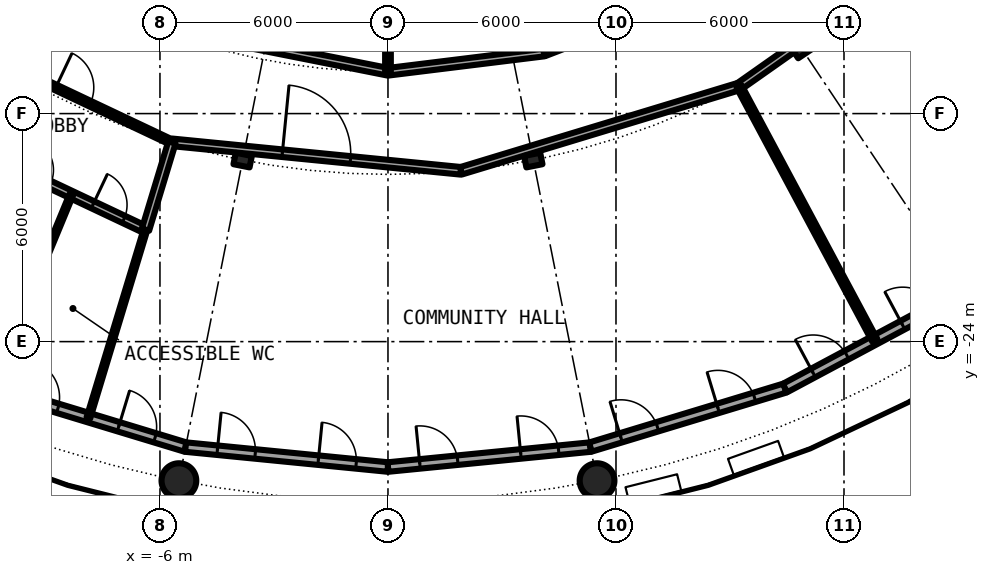
"""IFC4 building model, lengths in metres.
Left out: names, types, materials, properties, quantities, classifications, styles, units other than length and angle.
Written with IfcOpenShell. Run it as: python <this file> out.ifc"""

import sys

from ifc_helpers import new_model, si_unit, direction, frame, frame_2d, origin, origin_2d, place, context, subcontext, project, spatial, rectangle, hollow_circle, i_section, extrude, element, fill, save


model = new_model("IFC4")
c1 = context("Model", 3, precision=1e-05, world=origin(), true_north=direction((0.0, 1.0)))
c2 = subcontext(c1, "Body", "Model", "MODEL_VIEW")
j1 = project(units=[si_unit("LENGTHUNIT", "METRE"), si_unit("PLANEANGLEUNIT", "RADIAN")], contexts=[c1])
p1 = place(None, origin())
s1 = spatial("IfcSite", under=j1, at=p1, CompositionType="ELEMENT")
p2 = place(p1, origin())
s2 = spatial("IfcBuilding", under=s1, at=p2, CompositionType="ELEMENT")
p3 = place(p2, frame((0.0, 0.0, 107.45)))
s3 = spatial("IfcBuildingStorey", under=s2, at=p3, CompositionType="ELEMENT", Elevation=107.45)
for number, where, z_axis, x_axis in (
    (1, (-5.501, -27.658, 0.0), (0.0, 0.0, 1.0), (1.0, 0.0, 0.0)),
    (2, (5.501, -27.658, 0.0), (0.0, 0.0, 1.0), (1.0, 0.0, 0.0)),
):
    element("IfcColumn", number, at=place(p3, frame(where, z_axis=z_axis, x_axis=x_axis)), inside=s3, PredefinedType="COLUMN", context=c2, shape_type="SweptSolid", body=[
        extrude(hollow_circle(Radius=0.457, WallThickness=0.04, at=origin_2d()), origin(), (0.0, 0.0, 1.0), 4.2),
    ])
for number, where, z_axis, x_axis in (
    (3, (-3.824, -19.223, 0.0), (0.0, 0.0, 1.0), (-0.195, -0.981, 0.0)),
    (4, (3.824, -19.223, 0.0), (0.0, 0.0, 1.0), (0.195, -0.981, 0.0)),
    (5, (10.889, -16.297, 0.0), (0.0, 0.0, 1.0), (0.556, -0.831, 0.0)),
):
    element("IfcColumn", number, at=place(p3, frame(where, z_axis=z_axis, x_axis=x_axis)), inside=s3, PredefinedType="COLUMN", context=c2, shape_type="SweptSolid", body=[
        extrude(i_section(OverallWidth=0.307, OverallDepth=0.432, WebThickness=0.021, FlangeThickness=0.04, FilletRadius=0.027, at=origin_2d()), origin(), (0.0, 0.0, 1.0), 4.2),
    ])
p4 = place(p3, frame((-10.447, -25.222, 0.0), z_axis=(0.0, 0.0, 1.0), x_axis=(0.956965678721, -0.290201119486, 0.0)))
e6 = element("IfcWall", 6, at=p4, inside=s3, PredefinedType="SOLIDWALL", context=c2, shape_type="SweptSolid", body=[
    extrude(rectangle(XDim=5.351, YDim=0.25, at=frame_2d((2.676, 0.0))), origin(), (0.0, 0.0, 1.0), 3.85),
])
p5 = place(p4, frame((0.841, 0.0, 0.0)))
e7 = element("IfcOpeningElement", 7, at=p5, cuts=e6, PredefinedType="OPENING", context=c2, shape_type="SweptSolid", body=[
    extrude(rectangle(XDim=1.0, YDim=2.2, at=frame_2d((0.5, 1.1))), frame((0.0, 0.135, 0.0), z_axis=(0.0, -1.0, 0.0), x_axis=(1.0, 0.0, 0.0)), (0.0, 0.0, 1.0), 0.27),
])
p6 = place(p4, frame((3.51, 0.0, 0.0)))
e8 = element("IfcOpeningElement", 8, at=p6, cuts=e6, PredefinedType="OPENING", context=c2, shape_type="SweptSolid", body=[
    extrude(rectangle(XDim=1.0, YDim=2.2, at=frame_2d((0.5, 1.1))), frame((0.0, 0.135, 0.0), z_axis=(0.0, -1.0, 0.0), x_axis=(1.0, 0.0, 0.0)), (0.0, 0.0, 1.0), 0.27),
])
p7 = place(p3, frame((-5.326, -26.775, 0.0), z_axis=(0.0, 0.0, 1.0), x_axis=(0.995173996315, -0.098126026407, 0.0)))
e9 = element("IfcWall", 9, at=p7, inside=s3, PredefinedType="SOLIDWALL", context=c2, shape_type="SweptSolid", body=[
    extrude(rectangle(XDim=5.352, YDim=0.25, at=frame_2d((2.676, 0.0))), origin(), (0.0, 0.0, 1.0), 3.85),
])
p8 = place(p7, frame((0.841, 0.0, 0.0)))
e10 = element("IfcOpeningElement", 10, at=p8, cuts=e9, PredefinedType="OPENING", context=c2, shape_type="SweptSolid", body=[
    extrude(rectangle(XDim=1.0, YDim=2.2, at=frame_2d((0.5, 1.1))), frame((0.0, 0.135, 0.0), z_axis=(0.0, -1.0, 0.0), x_axis=(1.0, 0.0, 0.0)), (0.0, 0.0, 1.0), 0.27),
])
p9 = place(p7, frame((3.51, 0.0, 0.0)))
e11 = element("IfcOpeningElement", 11, at=p9, cuts=e9, PredefinedType="OPENING", context=c2, shape_type="SweptSolid", body=[
    extrude(rectangle(XDim=1.0, YDim=2.2, at=frame_2d((0.5, 1.1))), frame((0.0, 0.135, 0.0), z_axis=(0.0, -1.0, 0.0), x_axis=(1.0, 0.0, 0.0)), (0.0, 0.0, 1.0), 0.27),
])
p10 = place(p3, frame((0.0, -27.3, 0.0), z_axis=(0.0, 0.0, 1.0), x_axis=(0.995173996315, 0.098126026407, 0.0)))
e12 = element("IfcWall", 12, at=p10, inside=s3, PredefinedType="SOLIDWALL", context=c2, shape_type="SweptSolid", body=[
    extrude(rectangle(XDim=5.352, YDim=0.25, at=frame_2d((2.676, 0.0))), origin(), (0.0, 0.0, 1.0), 3.85),
])
p11 = place(p10, frame((0.841, 0.0, 0.0)))
e13 = element("IfcOpeningElement", 13, at=p11, cuts=e12, PredefinedType="OPENING", context=c2, shape_type="SweptSolid", body=[
    extrude(rectangle(XDim=1.0, YDim=2.2, at=frame_2d((0.5, 1.1))), frame((0.0, 0.135, 0.0), z_axis=(0.0, -1.0, 0.0), x_axis=(1.0, 0.0, 0.0)), (0.0, 0.0, 1.0), 0.27),
])
p12 = place(p10, frame((3.51, 0.0, 0.0)))
e14 = element("IfcOpeningElement", 14, at=p12, cuts=e12, PredefinedType="OPENING", context=c2, shape_type="SweptSolid", body=[
    extrude(rectangle(XDim=1.0, YDim=2.2, at=frame_2d((0.5, 1.1))), frame((0.0, 0.135, 0.0), z_axis=(0.0, -1.0, 0.0), x_axis=(1.0, 0.0, 0.0)), (0.0, 0.0, 1.0), 0.27),
])
p13 = place(p3, frame((5.326, -26.775, 0.0), z_axis=(0.0, 0.0, 1.0), x_axis=(0.956965678721, 0.290201119486, 0.0)))
e15 = element("IfcWall", 15, at=p13, inside=s3, PredefinedType="SOLIDWALL", context=c2, shape_type="SweptSolid", body=[
    extrude(rectangle(XDim=5.351, YDim=0.25, at=frame_2d((2.676, 0.0))), origin(), (0.0, 0.0, 1.0), 3.85),
])
p14 = place(p13, frame((0.841, 0.0, 0.0)))
e16 = element("IfcOpeningElement", 16, at=p14, cuts=e15, PredefinedType="OPENING", context=c2, shape_type="SweptSolid", body=[
    extrude(rectangle(XDim=1.0, YDim=2.2, at=frame_2d((0.5, 1.1))), frame((0.0, 0.135, 0.0), z_axis=(0.0, -1.0, 0.0), x_axis=(1.0, 0.0, 0.0)), (0.0, 0.0, 1.0), 0.27),
])
p15 = place(p13, frame((3.51, 0.0, 0.0)))
e17 = element("IfcOpeningElement", 17, at=p15, cuts=e15, PredefinedType="OPENING", context=c2, shape_type="SweptSolid", body=[
    extrude(rectangle(XDim=1.0, YDim=2.2, at=frame_2d((0.5, 1.1))), frame((0.0, 0.135, 0.0), z_axis=(0.0, -1.0, 0.0), x_axis=(1.0, 0.0, 0.0)), (0.0, 0.0, 1.0), 0.27),
])
p16 = place(p3, frame((10.447, -25.222, 0.0), z_axis=(0.0, 0.0, 1.0), x_axis=(0.881915646801, 0.471407246368, 0.0)))
e18 = element("IfcWall", 18, at=p16, inside=s3, PredefinedType="SOLIDWALL", context=c2, shape_type="SweptSolid", body=[
    extrude(rectangle(XDim=5.352, YDim=0.25, at=frame_2d((2.676, 0.0))), origin(), (0.0, 0.0, 1.0), 3.85),
])
p17 = place(p16, frame((0.841, 0.0, 0.0)))
e19 = element("IfcOpeningElement", 19, at=p17, cuts=e18, PredefinedType="OPENING", context=c2, shape_type="SweptSolid", body=[
    extrude(rectangle(XDim=1.0, YDim=2.2, at=frame_2d((0.5, 1.1))), frame((0.0, 0.135, 0.0), z_axis=(0.0, -1.0, 0.0), x_axis=(1.0, 0.0, 0.0)), (0.0, 0.0, 1.0), 0.27),
])
p18 = place(p16, frame((3.51, 0.0, 0.0)))
e20 = element("IfcOpeningElement", 20, at=p18, cuts=e18, PredefinedType="OPENING", context=c2, shape_type="SweptSolid", body=[
    extrude(rectangle(XDim=1.0, YDim=2.2, at=frame_2d((0.5, 1.1))), frame((0.0, 0.135, 0.0), z_axis=(0.0, -1.0, 0.0), x_axis=(1.0, 0.0, 0.0)), (0.0, 0.0, 1.0), 0.27),
])
p19 = place(p3, frame((-12.223, -18.294, 0.0), z_axis=(0.0, 0.0, 1.0), x_axis=(0.904110764787, -0.427298168726, 0.0)))
e21 = element("IfcWall", 21, at=p19, inside=s3, PredefinedType="PARTITIONING", context=c2, shape_type="SweptSolid", body=[
    extrude(rectangle(XDim=6.459, YDim=0.2, at=frame_2d((3.229, 0.0))), origin(), (0.0, 0.0, 1.0), 3.85),
])
p20 = place(p19, frame((0.624, 0.0, 0.0)))
e22 = element("IfcOpeningElement", 22, at=p20, cuts=e21, PredefinedType="OPENING", context=c2, shape_type="SweptSolid", body=[
    extrude(rectangle(XDim=0.9, YDim=2.3, at=frame_2d((0.45, 1.15))), frame((0.0, 0.11, 0.0), z_axis=(0.0, -1.0, 0.0), x_axis=(1.0, 0.0, 0.0)), (0.0, 0.0, 1.0), 0.22),
])
p21 = place(p19, frame((2.788, 0.0, 0.0)))
e23 = element("IfcOpeningElement", 23, at=p21, cuts=e21, PredefinedType="OPENING", context=c2, shape_type="SweptSolid", body=[
    extrude(rectangle(XDim=0.9, YDim=2.3, at=frame_2d((0.45, 1.15))), frame((0.0, 0.11, 0.0), z_axis=(0.0, -1.0, 0.0), x_axis=(1.0, 0.0, 0.0)), (0.0, 0.0, 1.0), 0.22),
])
p22 = place(p19, frame((4.93, 0.0, 0.0)))
e24 = element("IfcOpeningElement", 24, at=p22, cuts=e21, PredefinedType="OPENING", context=c2, shape_type="SweptSolid", body=[
    extrude(rectangle(XDim=0.9, YDim=2.3, at=frame_2d((0.45, 1.15))), frame((0.0, 0.11, 0.0), z_axis=(0.0, -1.0, 0.0), x_axis=(1.0, 0.0, 0.0)), (0.0, 0.0, 1.0), 0.22),
])
p23 = place(p3, frame((9.239, -17.286, 0.0), z_axis=(0.0, 0.0, 1.0), x_axis=(0.817743843048, 0.575582320052, 0.0)))
e25 = element("IfcWall", 25, at=p23, inside=s3, PredefinedType="PARTITIONING", context=c2, shape_type="SweptSolid", body=[
    extrude(rectangle(XDim=1.768, YDim=0.2, at=frame_2d((0.884, 0.0))), origin(), (0.0, 0.0, 1.0), 3.54),
])
p24 = place(p3, frame((-10.749, -16.363, 0.0), z_axis=(0.0, 0.0, 1.0), x_axis=(0.903968655954, -0.427598724335, 0.0)))
e26 = element("IfcWall", 26, at=p24, inside=s3, PredefinedType="PARTITIONING", context=c2, shape_type="SweptSolid", body=[
    extrude(rectangle(XDim=5.596, YDim=0.15, at=frame_2d((2.798, 0.0))), origin(), (0.0, 0.0, 1.0), 3.54),
])
p25 = place(p24, frame((2.221, 0.0, 0.0)))
e27 = element("IfcOpeningElement", 27, at=p25, cuts=e26, PredefinedType="OPENING", context=c2, shape_type="SweptSolid", body=[
    extrude(rectangle(XDim=1.0, YDim=2.3, at=frame_2d((0.5, 1.15))), frame((0.0, 0.085, 0.0), z_axis=(0.0, -1.0, 0.0), x_axis=(1.0, 0.0, 0.0)), (0.0, 0.0, 1.0), 0.17),
])
p26 = place(p3, frame((-5.69, -18.756, 0.0), z_axis=(0.0, 0.0, 1.0), x_axis=(0.995179652705, -0.098068643521, 0.0)))
e28 = element("IfcWall", 28, at=p26, inside=s3, PredefinedType="PARTITIONING", context=c2, shape_type="SweptSolid", body=[
    extrude(rectangle(XDim=7.648, YDim=0.2, at=frame_2d((3.824, 0.0))), origin(), (0.0, 0.0, 1.0), 3.54),
])
p27 = place(p26, frame((2.924, 0.0, 0.0)))
e29 = element("IfcOpeningElement", 29, at=p27, cuts=e28, PredefinedType="OPENING", context=c2, shape_type="SweptSolid", body=[
    extrude(rectangle(XDim=1.8, YDim=2.3, at=frame_2d((0.9, 1.15))), frame((0.0, 0.11, 0.0), z_axis=(0.0, -1.0, 0.0), x_axis=(1.0, 0.0, 0.0)), (0.0, 0.0, 1.0), 0.22),
])
p28 = place(p3, frame((1.921, -19.506, 0.0), z_axis=(0.0, 0.0, 1.0), x_axis=(0.956929842753, 0.290319265721, 0.0)))
e30 = element("IfcWall", 30, at=p28, inside=s3, PredefinedType="PARTITIONING", context=c2, shape_type="SweptSolid", body=[
    extrude(rectangle(XDim=7.647, YDim=0.2, at=frame_2d((3.824, 0.0))), origin(), (0.0, 0.0, 1.0), 3.54),
])
p29 = place(p3, frame((0.0, -16.9, 0.0), z_axis=(0.0, 0.0, 1.0), x_axis=(0.992496033272, 0.122276833211, 0.0)))
e31 = element("IfcWall", 31, at=p29, inside=s3, PredefinedType="PARTITIONING", context=c2, shape_type="SweptSolid", body=[
    extrude(rectangle(XDim=4.137, YDim=0.2, at=frame_2d((2.068, 0.0))), origin(), (0.0, 0.0, 1.0), 3.85),
])
p30 = place(p3, frame((4.106, -16.394, 0.0), z_axis=(0.0, 0.0, 1.0), x_axis=(0.932943640288, 0.360022449363, 0.0)))
e32 = element("IfcWall", 32, at=p30, inside=s3, PredefinedType="PARTITIONING", context=c2, shape_type="SweptSolid", body=[
    extrude(rectangle(XDim=4.139, YDim=0.2, at=frame_2d((2.069, 0.0))), origin(), (0.0, 0.0, 1.0), 3.85),
])
p31 = place(p30, frame((1.569, 0.0, 0.0)))
e33 = element("IfcOpeningElement", 33, at=p31, cuts=e32, PredefinedType="OPENING", context=c2, shape_type="SweptSolid", body=[
    extrude(rectangle(XDim=1.0, YDim=2.3, at=frame_2d((0.5, 1.15))), frame((0.0, 0.11, 0.0), z_axis=(0.0, -1.0, 0.0), x_axis=(1.0, 0.0, 0.0)), (0.0, 0.0, 1.0), 0.22),
])
p32 = place(p3, frame((-6.467, -15.614, 0.0), z_axis=(0.0, 0.0, 1.0), x_axis=(0.980799374359, -0.195019453537, 0.0)))
e34 = element("IfcWall", 34, at=p32, inside=s3, PredefinedType="PARTITIONING", context=c2, shape_type="SweptSolid", body=[
    extrude(rectangle(XDim=6.594, YDim=0.2, at=frame_2d((3.297, 0.0))), origin(), (0.0, 0.0, 1.0), 3.85),
])
p33 = place(p32, frame((2.797, 0.0, 0.0)))
e35 = element("IfcOpeningElement", 35, at=p33, cuts=e34, PredefinedType="OPENING", context=c2, shape_type="SweptSolid", body=[
    extrude(rectangle(XDim=1.0, YDim=2.3, at=frame_2d((0.5, 1.15))), frame((0.0, 0.11, 0.0), z_axis=(0.0, -1.0, 0.0), x_axis=(1.0, 0.0, 0.0)), (0.0, 0.0, 1.0), 0.22),
])
p34 = place(p3, frame((-10.391, -25.11, 0.0), z_axis=(0.0, 0.0, 1.0), x_axis=(0.38229040446, 0.924042232075, 0.0)))
e36 = element("IfcWall", 36, at=p34, inside=s3, PredefinedType="PARTITIONING", context=c2, shape_type="SweptSolid", body=[
    extrude(rectangle(XDim=5.386, YDim=0.1, at=frame_2d((2.693, 0.0))), origin(), (0.0, 0.0, 1.0), 3.85),
])
p35 = place(p3, frame((-7.883, -26.007, 0.0), z_axis=(0.0, 0.0, 1.0), x_axis=(0.290185435468, 0.95697043478, 0.0)))
e37 = element("IfcWall", 37, at=p35, inside=s3, PredefinedType="PARTITIONING", context=c2, shape_type="SweptSolid", body=[
    extrude(rectangle(XDim=5.176, YDim=0.1, at=frame_2d((2.588, 0.0))), origin(), (0.0, 0.0, 1.0), 3.85),
])
p36 = place(p3, frame((-6.381, -21.054, 0.0), z_axis=(0.0, 0.0, 1.0), x_axis=(0.290128842027, 0.956987593976, 0.0)))
e38 = element("IfcWall", 38, at=p36, inside=s3, PredefinedType="PARTITIONING", context=c2, shape_type="SweptSolid", body=[
    extrude(rectangle(XDim=2.399, YDim=0.2, at=frame_2d((1.2, 0.0))), origin(), (0.0, 0.0, 1.0), 3.85),
])
p37 = place(p3, frame((0.0, -16.9, 0.0), z_axis=(0.0, 0.0, 1.0), x_axis=(0.0, 1.0, 0.0)))
e39 = element("IfcWall", 39, at=p37, inside=s3, PredefinedType="PARTITIONING", context=c2, shape_type="SweptSolid", body=[
    extrude(rectangle(XDim=9.18, YDim=0.15, at=frame_2d((4.59, 0.0))), origin(), (0.0, 0.0, 1.0), 3.85),
])
p38 = place(p3, frame((9.239, -17.286, 0.0), z_axis=(0.0, 0.0, 1.0), x_axis=(0.471439510802, -0.881898399848, 0.0)))
e40 = element("IfcWall", 40, at=p38, inside=s3, PredefinedType="PARTITIONING", context=c2, shape_type="SweptSolid", body=[
    extrude(rectangle(XDim=7.575, YDim=0.15, at=frame_2d((3.787, 0.0))), origin(), (0.0, 0.0, 1.0), 3.85),
])
p39 = place(p5, origin())
e41 = element("IfcDoor", 41, at=p39, inside=s3, OperationType="SINGLE_SWING_LEFT", PredefinedType="DOOR", context=c2, shape_type="SweptSolid", body=[
    extrude(rectangle(XDim=1.0, YDim=2.2, at=frame_2d((0.5, 1.1))), frame((0.0, 0.025, 0.0), z_axis=(0.0, -1.0, 0.0), x_axis=(1.0, 0.0, 0.0)), (0.0, 0.0, 1.0), 0.05),
])
fill(e7, e41)
p40 = place(p6, origin())
e42 = element("IfcDoor", 42, at=p40, inside=s3, OperationType="SINGLE_SWING_LEFT", PredefinedType="DOOR", context=c2, shape_type="SweptSolid", body=[
    extrude(rectangle(XDim=1.0, YDim=2.2, at=frame_2d((0.5, 1.1))), frame((0.0, 0.025, 0.0), z_axis=(0.0, -1.0, 0.0), x_axis=(1.0, 0.0, 0.0)), (0.0, 0.0, 1.0), 0.05),
])
fill(e8, e42)
p41 = place(p8, origin())
e43 = element("IfcDoor", 43, at=p41, inside=s3, OperationType="SINGLE_SWING_LEFT", PredefinedType="DOOR", context=c2, shape_type="SweptSolid", body=[
    extrude(rectangle(XDim=1.0, YDim=2.2, at=frame_2d((0.5, 1.1))), frame((0.0, 0.025, 0.0), z_axis=(0.0, -1.0, 0.0), x_axis=(1.0, 0.0, 0.0)), (0.0, 0.0, 1.0), 0.05),
])
fill(e10, e43)
p42 = place(p9, origin())
e44 = element("IfcDoor", 44, at=p42, inside=s3, OperationType="SINGLE_SWING_LEFT", PredefinedType="DOOR", context=c2, shape_type="SweptSolid", body=[
    extrude(rectangle(XDim=1.0, YDim=2.2, at=frame_2d((0.5, 1.1))), frame((0.0, 0.025, 0.0), z_axis=(0.0, -1.0, 0.0), x_axis=(1.0, 0.0, 0.0)), (0.0, 0.0, 1.0), 0.05),
])
fill(e11, e44)
p43 = place(p11, origin())
e45 = element("IfcDoor", 45, at=p43, inside=s3, OperationType="SINGLE_SWING_LEFT", PredefinedType="DOOR", context=c2, shape_type="SweptSolid", body=[
    extrude(rectangle(XDim=1.0, YDim=2.2, at=frame_2d((0.5, 1.1))), frame((0.0, 0.025, 0.0), z_axis=(0.0, -1.0, 0.0), x_axis=(1.0, 0.0, 0.0)), (0.0, 0.0, 1.0), 0.05),
])
fill(e13, e45)
p44 = place(p12, origin())
e46 = element("IfcDoor", 46, at=p44, inside=s3, OperationType="SINGLE_SWING_LEFT", PredefinedType="DOOR", context=c2, shape_type="SweptSolid", body=[
    extrude(rectangle(XDim=1.0, YDim=2.2, at=frame_2d((0.5, 1.1))), frame((0.0, 0.025, 0.0), z_axis=(0.0, -1.0, 0.0), x_axis=(1.0, 0.0, 0.0)), (0.0, 0.0, 1.0), 0.05),
])
fill(e14, e46)
p45 = place(p14, origin())
e47 = element("IfcDoor", 47, at=p45, inside=s3, OperationType="SINGLE_SWING_LEFT", PredefinedType="DOOR", context=c2, shape_type="SweptSolid", body=[
    extrude(rectangle(XDim=1.0, YDim=2.2, at=frame_2d((0.5, 1.1))), frame((0.0, 0.025, 0.0), z_axis=(0.0, -1.0, 0.0), x_axis=(1.0, 0.0, 0.0)), (0.0, 0.0, 1.0), 0.05),
])
fill(e16, e47)
p46 = place(p15, origin())
e48 = element("IfcDoor", 48, at=p46, inside=s3, OperationType="SINGLE_SWING_LEFT", PredefinedType="DOOR", context=c2, shape_type="SweptSolid", body=[
    extrude(rectangle(XDim=1.0, YDim=2.2, at=frame_2d((0.5, 1.1))), frame((0.0, 0.025, 0.0), z_axis=(0.0, -1.0, 0.0), x_axis=(1.0, 0.0, 0.0)), (0.0, 0.0, 1.0), 0.05),
])
fill(e17, e48)
p47 = place(p17, origin())
e49 = element("IfcDoor", 49, at=p47, inside=s3, OperationType="SINGLE_SWING_LEFT", PredefinedType="DOOR", context=c2, shape_type="SweptSolid", body=[
    extrude(rectangle(XDim=1.0, YDim=2.2, at=frame_2d((0.5, 1.1))), frame((0.0, 0.025, 0.0), z_axis=(0.0, -1.0, 0.0), x_axis=(1.0, 0.0, 0.0)), (0.0, 0.0, 1.0), 0.05),
])
fill(e19, e49)
p48 = place(p18, origin())
e50 = element("IfcDoor", 50, at=p48, inside=s3, OperationType="SINGLE_SWING_LEFT", PredefinedType="DOOR", context=c2, shape_type="SweptSolid", body=[
    extrude(rectangle(XDim=1.0, YDim=2.2, at=frame_2d((0.5, 1.1))), frame((0.0, 0.025, 0.0), z_axis=(0.0, -1.0, 0.0), x_axis=(1.0, 0.0, 0.0)), (0.0, 0.0, 1.0), 0.05),
])
fill(e20, e50)
p49 = place(p25, origin())
e51 = element("IfcDoor", 51, at=p49, inside=s3, OperationType="SINGLE_SWING_LEFT", PredefinedType="DOOR", context=c2, shape_type="SweptSolid", body=[
    extrude(rectangle(XDim=1.0, YDim=2.3, at=frame_2d((0.5, 1.15))), frame((0.0, 0.025, 0.0), z_axis=(0.0, -1.0, 0.0), x_axis=(1.0, 0.0, 0.0)), (0.0, 0.0, 1.0), 0.05),
])
fill(e27, e51)
p50 = place(p22, origin())
e52 = element("IfcDoor", 52, at=p50, inside=s3, OperationType="SINGLE_SWING_RIGHT", PredefinedType="DOOR", context=c2, shape_type="SweptSolid", body=[
    extrude(rectangle(XDim=0.9, YDim=2.3, at=frame_2d((0.45, 1.15))), frame((0.0, 0.025, 0.0), z_axis=(0.0, -1.0, 0.0), x_axis=(1.0, 0.0, 0.0)), (0.0, 0.0, 1.0), 0.05),
])
fill(e24, e52)
p51 = place(p27, origin())
e53 = element("IfcDoor", 53, at=p51, inside=s3, OperationType="DOUBLE_DOOR_SINGLE_SWING", PredefinedType="DOOR", context=c2, shape_type="SweptSolid", body=[
    extrude(rectangle(XDim=1.8, YDim=2.3, at=frame_2d((0.9, 1.15))), frame((0.0, 0.025, 0.0), z_axis=(0.0, -1.0, 0.0), x_axis=(1.0, 0.0, 0.0)), (0.0, 0.0, 1.0), 0.05),
])
fill(e29, e53)
save(model, sys.argv[1])
